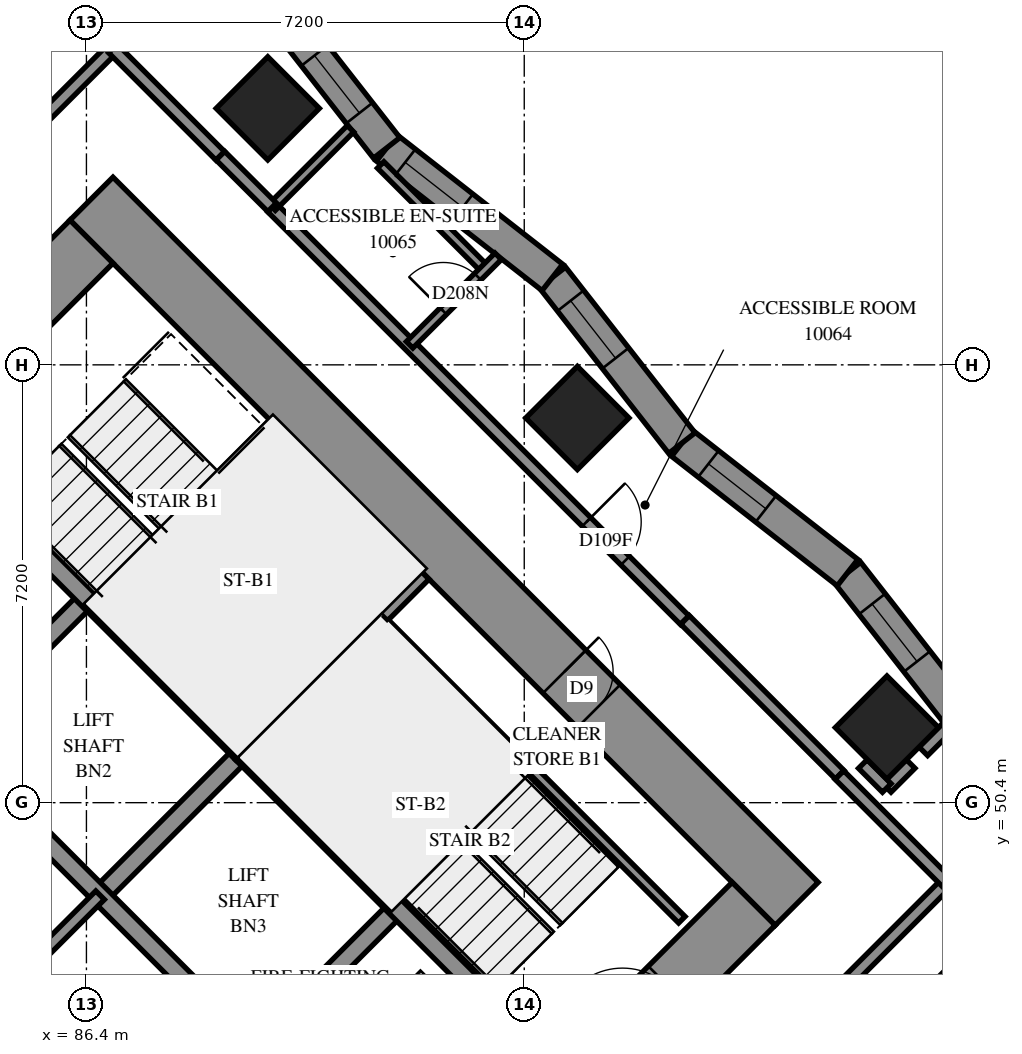
"""IFC4 building model, lengths in metres.
Left out: names, types, materials, properties, quantities, classifications, styles, units other than length and angle.
Written with IfcOpenShell. Run it as: python <this file> out.ifc"""

import sys

from ifc_helpers import new_model, si_unit, direction, frame, frame_2d, origin, origin_2d, place, context, subcontext, project, spatial, polyline, rectangle, outline, extrude, element, fill, save


model = new_model("IFC4")
c1 = context("Model", 3, precision=1e-05, world=origin(), true_north=direction((0.0, 1.0)))
c2 = subcontext(c1, "Body", "Model", "MODEL_VIEW")
j1 = project(units=[si_unit("LENGTHUNIT", "METRE"), si_unit("PLANEANGLEUNIT", "RADIAN")], contexts=[c1])
p1 = place(None, origin())
s1 = spatial("IfcSite", under=j1, at=p1, CompositionType="ELEMENT")
p2 = place(p1, origin())
s2 = spatial("IfcBuilding", under=s1, at=p2, CompositionType="ELEMENT")
p3 = place(p2, frame((0.0, 0.0, 40.6)))
s3 = spatial("IfcBuildingStorey", under=s2, at=p3, CompositionType="ELEMENT", Elevation=40.6)
for number, where, z_axis, x_axis in (
    (1, (89.382, 61.818, 0.0), (0.0, 0.0, 1.0), (0.707, -0.707, 0.0)),
    (2, (94.474, 56.727, 0.0), (0.0, 0.0, 1.0), (0.707, -0.707, 0.0)),
    (3, (99.565, 51.635, 0.0), (0.0, 0.0, 1.0), (0.707, -0.707, 0.0)),
):
    element("IfcColumn", number, at=place(p3, frame(where, z_axis=z_axis, x_axis=x_axis)), inside=s3, PredefinedType="COLUMN", context=c2, shape_type="SweptSolid", body=[
        extrude(rectangle(XDim=1.2, YDim=1.2, at=origin_2d()), origin(), (0.0, 0.0, 1.0), 3.1),
    ])
p4 = place(p3, frame((75.594, 49.443, -0.3), z_axis=(0.0, 0.0, 1.0), x_axis=(0.7071037324, -0.70710983, 0.0)))
e4 = element("IfcWall", 4, at=p4, inside=s3, PredefinedType="SHEAR", context=c2, shape_type="SweptSolid", body=[
    extrude(rectangle(XDim=16.4, YDim=1.0, at=frame_2d((8.2, 0.0))), origin(), (0.0, 0.0, 1.0), 2.7),
])
p5 = place(p3, frame((86.483, 60.333, -0.3), z_axis=(0.0, 0.0, 1.0), x_axis=(0.70710983, -0.7071037324, 0.0)))
e5 = element("IfcWall", 5, at=p5, inside=s3, PredefinedType="SHEAR", context=c2, shape_type="SweptSolid", body=[
    extrude(rectangle(XDim=16.4, YDim=1.0, at=frame_2d((8.2, 0.0))), origin(), (0.0, 0.0, 1.0), 2.7),
])
p6 = place(p5, frame((11.0, 0.0, 0.3)))
e6 = element("IfcOpeningElement", 6, at=p6, cuts=e5, PredefinedType="OPENING", context=c2, shape_type="SweptSolid", body=[
    extrude(rectangle(XDim=0.8, YDim=2.1, at=frame_2d((0.4, 1.05))), frame((0.0, 0.51, 0.0), z_axis=(0.0, -1.0, 0.0), x_axis=(1.0, 0.0, 0.0)), (0.0, 0.0, 1.0), 1.02),
])
p7 = place(p3, frame((76.301, 49.443, -0.3), z_axis=(0.0, 0.0, 1.0), x_axis=(0.7071067812, 0.7071067812, 0.0)))
e7 = element("IfcWall", 7, at=p7, inside=s3, PredefinedType="SHEAR", context=c2, shape_type="SweptSolid", body=[
    extrude(rectangle(XDim=14.4, YDim=1.0, at=frame_2d((7.2, 0.0))), origin(), (0.0, 0.0, 1.0), 2.7),
])
p8 = place(p7, frame((4.55, 0.0, 0.3)))
e8 = element("IfcOpeningElement", 8, at=p8, cuts=e7, PredefinedType="OPENING", context=c2, shape_type="SweptSolid", body=[
    extrude(rectangle(XDim=1.1, YDim=2.1, at=frame_2d((0.55, 1.05))), frame((0.0, 0.51, 0.0), z_axis=(0.0, -1.0, 0.0), x_axis=(1.0, 0.0, 0.0)), (0.0, 0.0, 1.0), 1.02),
])
p9 = place(p7, frame((11.35, 0.0, 0.3)))
e9 = element("IfcOpeningElement", 9, at=p9, cuts=e7, PredefinedType="OPENING", context=c2, shape_type="SweptSolid", body=[
    extrude(rectangle(XDim=1.1, YDim=2.1, at=frame_2d((0.55, 1.05))), frame((0.0, 0.51, 0.0), z_axis=(0.0, -1.0, 0.0), x_axis=(1.0, 0.0, 0.0)), (0.0, 0.0, 1.0), 1.02),
])
p10 = place(p3, frame((87.19, 38.554, -0.3), z_axis=(0.0, 0.0, 1.0), x_axis=(0.707103309, 0.7071102534, 0.0)))
e10 = element("IfcWall", 10, at=p10, inside=s3, PredefinedType="SHEAR", context=c2, shape_type="SweptSolid", body=[
    extrude(rectangle(XDim=14.4, YDim=1.0, at=frame_2d((7.2, 0.0))), origin(), (0.0, 0.0, 1.0), 2.7),
])
p11 = place(p10, frame((4.55, 0.0, 0.3)))
e11 = element("IfcOpeningElement", 11, at=p11, cuts=e10, PredefinedType="OPENING", context=c2, shape_type="SweptSolid", body=[
    extrude(rectangle(XDim=1.1, YDim=2.1, at=frame_2d((0.55, 1.05))), frame((0.0, 0.51, 0.0), z_axis=(0.0, -1.0, 0.0), x_axis=(1.0, 0.0, 0.0)), (0.0, 0.0, 1.0), 1.02),
])
p12 = place(p10, frame((11.35, 0.0, 0.3)))
e12 = element("IfcOpeningElement", 12, at=p12, cuts=e10, PredefinedType="OPENING", context=c2, shape_type="SweptSolid", body=[
    extrude(rectangle(XDim=1.1, YDim=2.1, at=frame_2d((0.55, 1.05))), frame((0.0, 0.51, 0.0), z_axis=(0.0, -1.0, 0.0), x_axis=(1.0, 0.0, 0.0)), (0.0, 0.0, 1.0), 1.02),
])
p13 = place(p3, frame((84.079, 51.423, 0.0), z_axis=(0.0, 0.0, 1.0), x_axis=(0.7071219326, 0.7070916295, 0.0)))
e13 = element("IfcWall", 13, at=p13, inside=s3, PredefinedType="SOLIDWALL", context=c2, shape_type="SweptSolid", body=[
    extrude(rectangle(XDim=3.3, YDim=0.3, at=frame_2d((1.65, 0.0))), origin(), (0.0, 0.0, 1.0), 3.1),
])
for number, where, z_axis, x_axis in (
    (14, (86.625, 48.878, 0.0), (0.0, 0.0, 1.0), (0.707, 0.707, 0.0)),
    (15, (89.17, 46.332, 0.0), (0.0, 0.0, 1.0), (0.707, 0.707, 0.0)),
):
    element("IfcWall", number, at=place(p3, frame(where, z_axis=z_axis, x_axis=x_axis)), inside=s3, PredefinedType="SOLIDWALL", context=c2, shape_type="SweptSolid", body=[
        extrude(rectangle(XDim=3.3, YDim=0.3, at=frame_2d((1.65, 0.0))), origin(), (0.0, 0.0, 1.0), 3.1),
    ])
p14 = place(p3, frame((78.988, 51.423, 0.0), z_axis=(0.0, 0.0, 1.0), x_axis=(0.7071067812, -0.7071067812, 0.0)))
e16 = element("IfcWall", 16, at=p14, inside=s3, PredefinedType="SOLIDWALL", context=c2, shape_type="SweptSolid", body=[
    extrude(rectangle(XDim=14.4, YDim=0.3, at=frame_2d((7.2, 0.0))), origin(), (0.0, 0.0, 1.0), 3.1),
])
p15 = place(p14, frame((1.25, 0.0, 0.0)))
e17 = element("IfcOpeningElement", 17, at=p15, cuts=e16, PredefinedType="OPENING", context=c2, shape_type="SweptSolid", body=[
    extrude(rectangle(XDim=1.1, YDim=2.1, at=frame_2d((0.55, 1.05))), frame((0.0, 0.16, 0.0), z_axis=(0.0, -1.0, 0.0), x_axis=(1.0, 0.0, 0.0)), (0.0, 0.0, 1.0), 0.32),
])
p16 = place(p14, frame((4.85, 0.0, 0.0)))
e18 = element("IfcOpeningElement", 18, at=p16, cuts=e16, PredefinedType="OPENING", context=c2, shape_type="SweptSolid", body=[
    extrude(rectangle(XDim=1.1, YDim=2.1, at=frame_2d((0.55, 1.05))), frame((0.0, 0.16, 0.0), z_axis=(0.0, -1.0, 0.0), x_axis=(1.0, 0.0, 0.0)), (0.0, 0.0, 1.0), 0.32),
])
p17 = place(p14, frame((8.45, 0.0, 0.0)))
e19 = element("IfcOpeningElement", 19, at=p17, cuts=e16, PredefinedType="OPENING", context=c2, shape_type="SweptSolid", body=[
    extrude(rectangle(XDim=1.1, YDim=2.1, at=frame_2d((0.55, 1.05))), frame((0.0, 0.16, 0.0), z_axis=(0.0, -1.0, 0.0), x_axis=(1.0, 0.0, 0.0)), (0.0, 0.0, 1.0), 0.32),
])
p18 = place(p14, frame((12.05, 0.0, 0.0)))
e20 = element("IfcOpeningElement", 20, at=p18, cuts=e16, PredefinedType="OPENING", context=c2, shape_type="SweptSolid", body=[
    extrude(rectangle(XDim=1.1, YDim=2.1, at=frame_2d((0.55, 1.05))), frame((0.0, 0.16, 0.0), z_axis=(0.0, -1.0, 0.0), x_axis=(1.0, 0.0, 0.0)), (0.0, 0.0, 1.0), 0.32),
])
p19 = place(p3, frame((81.534, 53.969, 0.0), z_axis=(0.0, 0.0, 1.0), x_axis=(0.707103309, -0.7071102534, 0.0)))
e21 = element("IfcWall", 21, at=p19, inside=s3, PredefinedType="SOLIDWALL", context=c2, shape_type="SweptSolid", body=[
    extrude(rectangle(XDim=14.4, YDim=0.3, at=frame_2d((7.2, 0.0))), origin(), (0.0, 0.0, 1.0), 3.1),
])
p20 = place(p19, frame((12.05, 0.0, 0.0)))
e22 = element("IfcOpeningElement", 22, at=p20, cuts=e21, PredefinedType="OPENING", context=c2, shape_type="SweptSolid", body=[
    extrude(rectangle(XDim=1.1, YDim=2.1, at=frame_2d((0.55, 1.05))), frame((0.0, 0.16, 0.0), z_axis=(0.0, -1.0, 0.0), x_axis=(1.0, 0.0, 0.0)), (0.0, 0.0, 1.0), 0.32),
])
for number, where, z_axis, x_axis in (
    (23, (83.867, 56.302, 0.0), (0.0, 0.0, 1.0), (0.707, -0.707, 0.0)),
    (24, (88.958, 51.211, 0.0), (0.0, 0.0, 1.0), (0.707, -0.707, 0.0)),
):
    element("IfcWall", number, at=place(p3, frame(where, z_axis=z_axis, x_axis=x_axis)), inside=s3, PredefinedType="SOLIDWALL", context=c2, shape_type="SweptSolid", body=[
        extrude(rectangle(XDim=7.2, YDim=0.3, at=frame_2d((3.6, 0.0))), origin(), (0.0, 0.0, 1.0), 3.1),
    ])
p21 = place(p3, frame((88.958, 51.211, 0.0), z_axis=(0.0, 0.0, 1.0), x_axis=(0.7071067812, 0.7071067812, 0.0)))
e25 = element("IfcWall", 25, at=p21, inside=s3, PredefinedType="SOLIDWALL", context=c2, shape_type="SweptSolid", body=[
    extrude(rectangle(XDim=4.2, YDim=0.3, at=frame_2d((2.1, 0.0))), origin(), (0.0, 0.0, 1.0), 3.1),
])
p22 = place(p3, frame((101.046, 51.459, 0.0), z_axis=(0.0, 0.0, 1.0), x_axis=(-0.6157607558, 0.7879331771, 0.0)))
e26 = element("IfcWall", 26, at=p22, inside=s3, PredefinedType="SOLIDWALL", context=c2, shape_type="SweptSolid", body=[
    extrude(outline(polyline([(0.034, -0.275), (3.492, -0.275), (3.425, 0.275), (-0.034, 0.275), (0.034, -0.275)])), origin(), (0.0, 0.0, 1.0), 3.1),
])
p23 = place(p22, frame((1.603, 0.0, 0.5)))
e27 = element("IfcOpeningElement", 27, at=p23, cuts=e26, PredefinedType="OPENING", context=c2, shape_type="SweptSolid", body=[
    extrude(rectangle(XDim=1.2, YDim=2.45, at=frame_2d((0.6, 1.225))), frame((0.0, 0.285, 0.0), z_axis=(0.0, -1.0, 0.0), x_axis=(1.0, 0.0, 0.0)), (0.0, 0.0, 1.0), 0.57),
])
p24 = place(p3, frame((98.917, 54.184, 0.0), z_axis=(0.0, 0.0, 1.0), x_axis=(-0.7879301115, 0.6157646785, 0.0)))
e28 = element("IfcWall", 28, at=p24, inside=s3, PredefinedType="SOLIDWALL", context=c2, shape_type="SweptSolid", body=[
    extrude(outline(polyline([(-0.034, -0.275), (3.425, -0.275), (3.492, 0.275), (0.034, 0.275), (-0.034, -0.275)])), origin(), (0.0, 0.0, 1.0), 3.1),
])
p25 = place(p24, frame((1.704, 0.0, 0.5)))
e29 = element("IfcOpeningElement", 29, at=p25, cuts=e28, PredefinedType="OPENING", context=c2, shape_type="SweptSolid", body=[
    extrude(rectangle(XDim=1.2, YDim=2.45, at=frame_2d((0.6, 1.225))), frame((0.0, 0.285, 0.0), z_axis=(0.0, -1.0, 0.0), x_axis=(1.0, 0.0, 0.0)), (0.0, 0.0, 1.0), 0.57),
])
p26 = place(p3, frame((96.192, 56.313, 0.0), z_axis=(0.0, 0.0, 1.0), x_axis=(-0.6157607558, 0.7879331771, 0.0)))
e30 = element("IfcWall", 30, at=p26, inside=s3, PredefinedType="SOLIDWALL", context=c2, shape_type="SweptSolid", body=[
    extrude(outline(polyline([(0.034, -0.275), (3.492, -0.275), (3.425, 0.275), (-0.034, 0.275), (0.034, -0.275)])), origin(), (0.0, 0.0, 1.0), 3.1),
])
p27 = place(p26, frame((1.772, 0.0, 0.5)))
e31 = element("IfcOpeningElement", 31, at=p27, cuts=e30, PredefinedType="OPENING", context=c2, shape_type="SweptSolid", body=[
    extrude(rectangle(XDim=1.2, YDim=2.45, at=frame_2d((0.6, 1.225))), frame((0.0, 0.285, 0.0), z_axis=(0.0, -1.0, 0.0), x_axis=(1.0, 0.0, 0.0)), (0.0, 0.0, 1.0), 0.57),
])
p28 = place(p3, frame((94.063, 59.038, 0.0), z_axis=(0.0, 0.0, 1.0), x_axis=(-0.787944141, 0.6157467261, 0.0)))
e32 = element("IfcWall", 32, at=p28, inside=s3, PredefinedType="SOLIDWALL", context=c2, shape_type="SweptSolid", body=[
    extrude(outline(polyline([(-0.034, -0.275), (3.425, -0.275), (3.492, 0.275), (0.034, 0.275), (-0.034, -0.275)])), origin(), (0.0, 0.0, 1.0), 3.1),
])
p29 = place(p28, frame((1.873, 0.0, 0.5)))
e33 = element("IfcOpeningElement", 33, at=p29, cuts=e32, PredefinedType="OPENING", context=c2, shape_type="SweptSolid", body=[
    extrude(rectangle(XDim=1.2, YDim=2.45, at=frame_2d((0.6, 1.225))), frame((0.0, 0.285, 0.0), z_axis=(0.0, -1.0, 0.0), x_axis=(1.0, 0.0, 0.0)), (0.0, 0.0, 1.0), 0.57),
])
p30 = place(p3, frame((91.338, 61.167, 0.0), z_axis=(0.0, 0.0, 1.0), x_axis=(-0.6157467261, 0.787944141, 0.0)))
e34 = element("IfcWall", 34, at=p30, inside=s3, PredefinedType="SOLIDWALL", context=c2, shape_type="SweptSolid", body=[
    extrude(outline(polyline([(0.034, -0.275), (3.492, -0.275), (3.425, 0.275), (-0.034, 0.275), (0.034, -0.275)])), origin(), (0.0, 0.0, 1.0), 3.1),
])
p31 = place(p30, frame((0.728, 0.0, 0.5)))
e35 = element("IfcOpeningElement", 35, at=p31, cuts=e34, PredefinedType="OPENING", context=c2, shape_type="SweptSolid", body=[
    extrude(rectangle(XDim=1.2, YDim=2.45, at=frame_2d((0.6, 1.225))), frame((0.0, 0.285, 0.0), z_axis=(0.0, -1.0, 0.0), x_axis=(1.0, 0.0, 0.0)), (0.0, 0.0, 1.0), 0.57),
])
p32 = place(p3, frame((91.313, 53.354, 0.0), z_axis=(0.0, 0.0, 1.0), x_axis=(0.7071140275, -0.7070995348, 0.0)))
e36 = element("IfcWall", 36, at=p32, inside=s3, PredefinedType="PARTITIONING", context=c2, shape_type="SweptSolid", body=[
    extrude(rectangle(XDim=6.9, YDim=0.15, at=frame_2d((3.45, 0.0))), origin(), (0.0, 0.0, 1.0), 3.1),
])
p33 = place(p3, frame((84.079, 46.332, 0.0), z_axis=(0.0, 0.0, 1.0), x_axis=(0.7071067812, 0.7071067812, 0.0)))
e37 = element("IfcWall", 37, at=p33, inside=s3, PredefinedType="PARTITIONING", context=c2, shape_type="SweptSolid", body=[
    extrude(rectangle(XDim=3.6, YDim=0.2, at=frame_2d((1.8, 0.0))), origin(), (0.0, 0.0, 1.0), 3.1),
])
p34 = place(p3, frame((94.367, 41.349, 0.0), z_axis=(0.0, 0.0, 1.0), x_axis=(0.7071109856, 0.7071025768, 0.0)))
e38 = element("IfcWall", 38, at=p34, inside=s3, PredefinedType="PARTITIONING", context=c2, shape_type="SweptSolid", body=[
    extrude(rectangle(XDim=11.892, YDim=0.2, at=frame_2d((5.946, 0.0))), origin(), (0.0, 0.0, 1.0), 3.1),
])
p35 = place(p3, frame((79.871, 55.843, 0.0), z_axis=(0.0, 0.0, 1.0), x_axis=(0.7071067812, 0.7071067812, 0.0)))
e39 = element("IfcWall", 39, at=p35, inside=s3, PredefinedType="PARTITIONING", context=c2, shape_type="SweptSolid", body=[
    extrude(rectangle(XDim=9.85, YDim=0.2, at=frame_2d((4.925, 0.0))), origin(), (0.0, 0.0, 1.0), 3.1),
])
p36 = place(p35, frame((1.135, 0.0, 0.0)))
e40 = element("IfcOpeningElement", 40, at=p36, cuts=e39, PredefinedType="OPENING", context=c2, shape_type="SweptSolid", body=[
    extrude(rectangle(XDim=1.0, YDim=2.1, at=frame_2d((0.5, 1.05))), frame((0.0, 0.11, 0.0), z_axis=(0.0, -1.0, 0.0), x_axis=(1.0, 0.0, 0.0)), (0.0, 0.0, 1.0), 0.22),
])
p37 = place(p3, frame((93.59, 42.126, 0.0), z_axis=(0.0, 0.0, 1.0), x_axis=(0.7071067812, 0.7071067812, 0.0)))
e41 = element("IfcWall", 41, at=p37, inside=s3, PredefinedType="PARTITIONING", context=c2, shape_type="SweptSolid", body=[
    extrude(rectangle(XDim=9.849, YDim=0.2, at=frame_2d((4.924, 0.0))), origin(), (0.0, 0.0, 1.0), 3.1),
])
p38 = place(p37, frame((0.148, 0.0, 0.0)))
e42 = element("IfcOpeningElement", 42, at=p38, cuts=e41, PredefinedType="OPENING", context=c2, shape_type="SweptSolid", body=[
    extrude(rectangle(XDim=1.0, YDim=2.1, at=frame_2d((0.5, 1.05))), frame((0.0, 0.11, 0.0), z_axis=(0.0, -1.0, 0.0), x_axis=(1.0, 0.0, 0.0)), (0.0, 0.0, 1.0), 0.22),
])
p39 = place(p3, frame((89.451, 60.189, 0.0), z_axis=(0.0, 0.0, 1.0), x_axis=(0.7071796965, -0.7070338583, 0.0)))
e43 = element("IfcWall", 43, at=p39, inside=s3, PredefinedType="PARTITIONING", context=c2, shape_type="SweptSolid", body=[
    extrude(rectangle(XDim=9.6, YDim=0.2, at=frame_2d((4.8, 0.0))), origin(), (0.0, 0.0, 1.0), 3.1),
])
p40 = place(p39, frame((7.315, 0.0, 0.0)))
e44 = element("IfcOpeningElement", 44, at=p40, cuts=e43, PredefinedType="OPENING", context=c2, shape_type="SweptSolid", body=[
    extrude(rectangle(XDim=0.9, YDim=2.1, at=frame_2d((0.45, 1.05))), frame((0.0, 0.11, 0.0), z_axis=(0.0, -1.0, 0.0), x_axis=(1.0, 0.0, 0.0)), (0.0, 0.0, 1.0), 0.22),
])
p41 = place(p3, frame((96.244, 53.406, 0.0), z_axis=(0.0, 0.0, 1.0), x_axis=(0.7068288851, -0.7073845681, 0.0)))
e45 = element("IfcWall", 45, at=p41, inside=s3, PredefinedType="PARTITIONING", context=c2, shape_type="SweptSolid", body=[
    extrude(rectangle(XDim=3.599, YDim=0.2, at=frame_2d((1.8, 0.0))), origin(), (0.0, 0.0, 1.0), 3.1),
])
p42 = place(p3, frame((98.783, 50.855, 0.0), z_axis=(0.0, 0.0, 1.0), x_axis=(0.7071067812, -0.7071067812, 0.0)))
e46 = element("IfcWall", 46, at=p42, inside=s3, PredefinedType="PARTITIONING", context=c2, shape_type="SweptSolid", body=[
    extrude(rectangle(XDim=2.5, YDim=0.2, at=frame_2d((1.25, 0.0))), origin(), (0.0, 0.0, 1.0), 3.1),
])
p43 = place(p3, frame((86.835, 62.803, 0.0), z_axis=(0.0, 0.0, 1.0), x_axis=(0.7071067812, -0.7071067812, 0.0)))
e47 = element("IfcWall", 47, at=p43, inside=s3, PredefinedType="PARTITIONING", context=c2, shape_type="SweptSolid", body=[
    extrude(rectangle(XDim=2.498, YDim=0.2, at=frame_2d((1.249, 0.0))), origin(), (0.0, 0.0, 1.0), 3.1),
])
p44 = place(p3, frame((91.239, 60.888, 0.0), z_axis=(0.0, 0.0, 1.0), x_axis=(0.7071067812, -0.7071067812, 0.0)))
e48 = element("IfcWall", 48, at=p44, inside=s3, PredefinedType="PARTITIONING", context=c2, shape_type="SweptSolid", body=[
    extrude(rectangle(XDim=2.43, YDim=0.15, at=frame_2d((1.215, 0.0))), origin(), (0.0, 0.0, 1.0), 3.1),
])
p45 = place(p3, frame((91.715, 57.929, 0.0), z_axis=(0.0, 0.0, 1.0), x_axis=(0.7071067812, 0.7071067812, 0.0)))
e49 = element("IfcWall", 49, at=p45, inside=s3, PredefinedType="PARTITIONING", context=c2, shape_type="SweptSolid", body=[
    extrude(rectangle(XDim=2.06, YDim=0.15, at=frame_2d((1.03, 0.0))), origin(), (0.0, 0.0, 1.0), 3.1),
])
p46 = place(p45, frame((0.784, 0.0, 0.0)))
e50 = element("IfcOpeningElement", 50, at=p46, cuts=e49, PredefinedType="OPENING", context=c2, shape_type="SweptSolid", body=[
    extrude(rectangle(XDim=0.8, YDim=2.1, at=frame_2d((0.4, 1.05))), frame((0.0, 0.085, 0.0), z_axis=(0.0, -1.0, 0.0), x_axis=(1.0, 0.0, 0.0)), (0.0, 0.0, 1.0), 0.17),
])
p47 = place(p3, frame((89.453, 60.193, 0.0), z_axis=(0.0, 0.0, 1.0), x_axis=(0.7071341975, 0.7070793639, 0.0)))
e51 = element("IfcWall", 51, at=p47, inside=s3, PredefinedType="PARTITIONING", context=c2, shape_type="SweptSolid", body=[
    extrude(rectangle(XDim=1.824, YDim=0.15, at=frame_2d((0.912, 0.0))), origin(), (0.0, 0.0, 1.0), 3.1),
])
p48 = place(p3, frame((88.603, 61.039, 0.0), z_axis=(0.0, 0.0, 1.0), x_axis=(0.7079391603, -0.7062734211, 0.0)))
e52 = element("IfcWall", 52, at=p48, inside=s3, PredefinedType="PARTITIONING", context=c2, shape_type="SweptSolid", body=[
    extrude(rectangle(XDim=1.201, YDim=0.2, at=frame_2d((0.6, 0.0))), origin(), (0.0, 0.0, 1.0), 3.1),
])
for number, where, z_axis, x_axis in (
    (53, (99.561, 50.643, 0.0), (0.0, 0.0, 1.0), (0.707, 0.707, 0.0)),
    (54, (99.168, 51.036, 0.0), (0.0, 0.0, 1.0), (0.707, -0.707, 0.0)),
):
    element("IfcWall", number, at=place(p3, frame(where, z_axis=z_axis, x_axis=x_axis)), inside=s3, PredefinedType="PARTITIONING", context=c2, shape_type="SweptSolid", body=[
        extrude(rectangle(XDim=0.557, YDim=0.2, at=frame_2d((0.279, 0.0))), origin(), (0.0, 0.0, 1.0), 3.1),
    ])
p49 = place(p3, frame((100.163, 51.245, 0.0), z_axis=(0.0, 0.0, 1.0), x_axis=(0.7071067812, 0.7071067812, 0.0)))
e55 = element("IfcWall", 55, at=p49, inside=s3, PredefinedType="PARTITIONING", context=c2, shape_type="SweptSolid", body=[
    extrude(rectangle(XDim=0.557, YDim=0.2, at=frame_2d((0.278, 0.0))), origin(), (0.0, 0.0, 1.0), 3.1),
])
p50 = place(p23, origin())
e56 = element("IfcWindow", 56, at=p50, inside=s3, PartitioningType="SINGLE_PANEL", PredefinedType="WINDOW", context=c2, shape_type="SweptSolid", body=[
    extrude(rectangle(XDim=1.2, YDim=2.45, at=frame_2d((0.6, 1.225))), frame((0.0, 0.155, 0.0), z_axis=(0.0, -1.0, 0.0), x_axis=(1.0, 0.0, 0.0)), (0.0, 0.0, 1.0), 0.06),
])
fill(e27, e56)
p51 = place(p25, origin())
e57 = element("IfcWindow", 57, at=p51, inside=s3, PartitioningType="SINGLE_PANEL", PredefinedType="WINDOW", context=c2, shape_type="SweptSolid", body=[
    extrude(rectangle(XDim=1.2, YDim=2.45, at=frame_2d((0.6, 1.225))), frame((0.0, 0.155, 0.0), z_axis=(0.0, -1.0, 0.0), x_axis=(1.0, 0.0, 0.0)), (0.0, 0.0, 1.0), 0.06),
])
fill(e29, e57)
p52 = place(p27, origin())
e58 = element("IfcWindow", 58, at=p52, inside=s3, PartitioningType="SINGLE_PANEL", PredefinedType="WINDOW", context=c2, shape_type="SweptSolid", body=[
    extrude(rectangle(XDim=1.2, YDim=2.45, at=frame_2d((0.6, 1.225))), frame((0.0, 0.155, 0.0), z_axis=(0.0, -1.0, 0.0), x_axis=(1.0, 0.0, 0.0)), (0.0, 0.0, 1.0), 0.06),
])
fill(e31, e58)
p53 = place(p29, origin())
e59 = element("IfcWindow", 59, at=p53, inside=s3, PartitioningType="SINGLE_PANEL", PredefinedType="WINDOW", context=c2, shape_type="SweptSolid", body=[
    extrude(rectangle(XDim=1.2, YDim=2.45, at=frame_2d((0.6, 1.225))), frame((0.0, 0.155, 0.0), z_axis=(0.0, -1.0, 0.0), x_axis=(1.0, 0.0, 0.0)), (0.0, 0.0, 1.0), 0.06),
])
fill(e33, e59)
p54 = place(p31, origin())
e60 = element("IfcWindow", 60, at=p54, inside=s3, PartitioningType="SINGLE_PANEL", PredefinedType="WINDOW", context=c2, shape_type="SweptSolid", body=[
    extrude(rectangle(XDim=1.2, YDim=2.45, at=frame_2d((0.6, 1.225))), frame((0.0, 0.155, 0.0), z_axis=(0.0, -1.0, 0.0), x_axis=(1.0, 0.0, 0.0)), (0.0, 0.0, 1.0), 0.06),
])
fill(e35, e60)
p55 = place(p6, origin())
e61 = element("IfcDoor", 61, at=p55, inside=s3, OperationType="SINGLE_SWING_RIGHT", PredefinedType="DOOR", context=c2, shape_type="SweptSolid", body=[
    extrude(rectangle(XDim=0.8, YDim=2.1, at=frame_2d((0.4, 1.05))), frame((0.0, -0.44, 0.0), z_axis=(0.0, -1.0, 0.0), x_axis=(1.0, 0.0, 0.0)), (0.0, 0.0, 1.0), 0.05),
])
fill(e6, e61)
p56 = place(p40, origin())
e62 = element("IfcDoor", 62, at=p56, inside=s3, OperationType="SINGLE_SWING_LEFT", PredefinedType="DOOR", context=c2, shape_type="SweptSolid", body=[
    extrude(rectangle(XDim=0.9, YDim=2.1, at=frame_2d((0.45, 1.05))), frame((0.0, 0.025, 0.0), z_axis=(0.0, -1.0, 0.0), x_axis=(1.0, 0.0, 0.0)), (0.0, 0.0, 1.0), 0.05),
])
fill(e44, e62)
p57 = place(p46, origin())
e63 = element("IfcDoor", 63, at=p57, inside=s3, OperationType="SINGLE_SWING_RIGHT", PredefinedType="DOOR", context=c2, shape_type="SweptSolid", body=[
    extrude(rectangle(XDim=0.8, YDim=2.1, at=frame_2d((0.4, 1.05))), frame((0.0, 0.025, 0.0), z_axis=(0.0, -1.0, 0.0), x_axis=(1.0, 0.0, 0.0)), (0.0, 0.0, 1.0), 0.05),
])
fill(e50, e63)
save(model, sys.argv[1])
